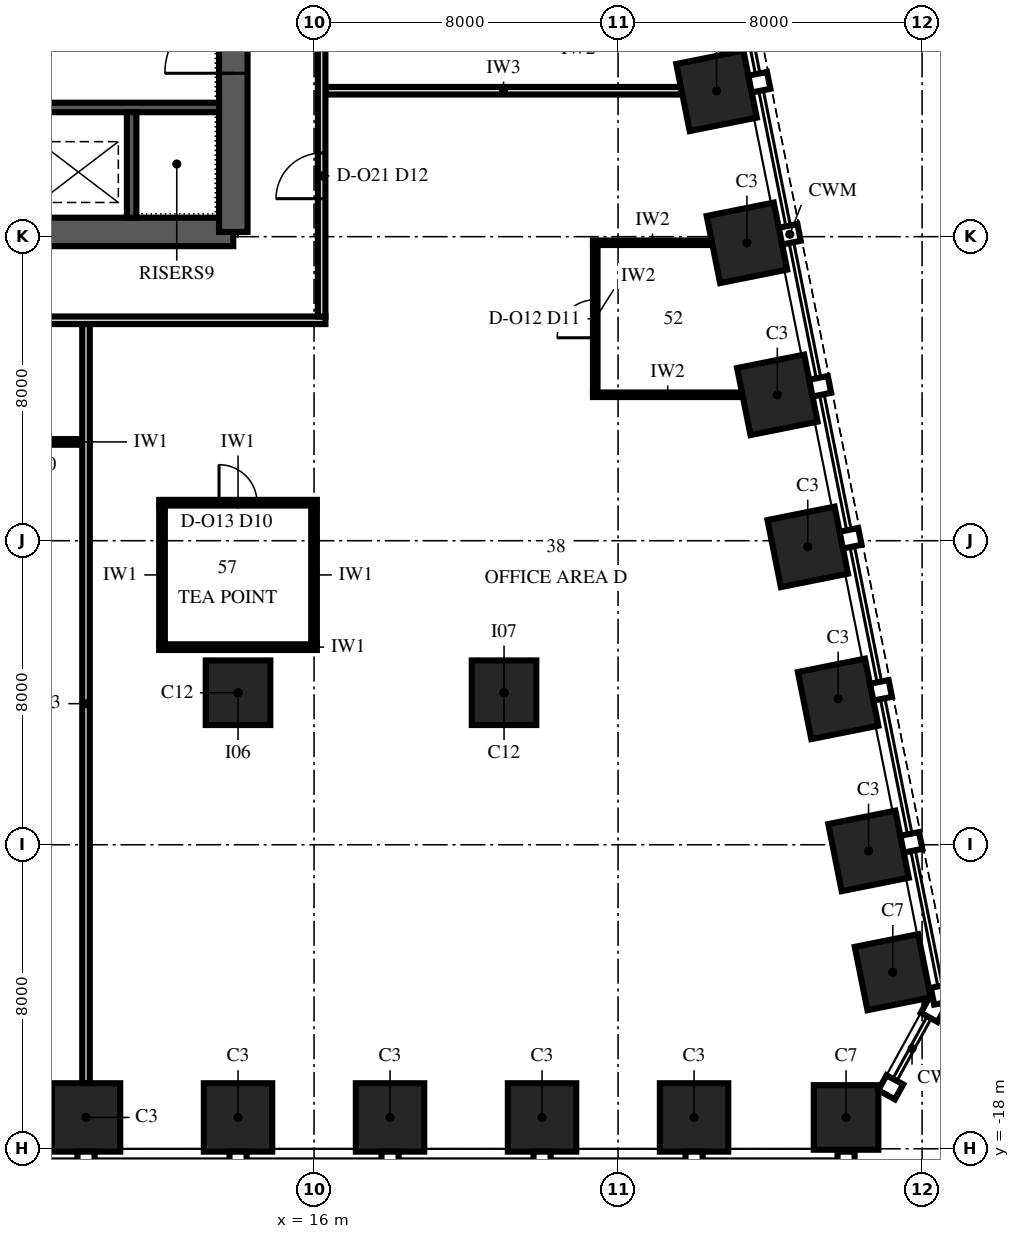
"""IFC4 building model, lengths in metres.
Left out: names, types, materials, properties, quantities, classifications, styles, units other than length and angle.
Written with IfcOpenShell. Run it as: python <this file> out.ifc"""

import sys

from ifc_helpers import new_model, si_unit, direction, frame, frame_2d, origin, origin_2d, place, context, subcontext, project, spatial, polyline, rectangle, outline, extrude, element, fill, save


model = new_model("IFC4")
c1 = context("Model", 3, precision=1e-05, world=origin(), true_north=direction((0.0, 1.0)))
c2 = subcontext(c1, "Body", "Model", "MODEL_VIEW")
j1 = project(units=[si_unit("LENGTHUNIT", "METRE"), si_unit("PLANEANGLEUNIT", "RADIAN")], contexts=[c1])
p1 = place(None, origin())
s1 = spatial("IfcSite", under=j1, at=p1, CompositionType="ELEMENT")
p2 = place(p1, origin())
s2 = spatial("IfcBuilding", under=s1, at=p2, CompositionType="ELEMENT")
p3 = place(p2, frame((0.0, 0.0, 151.0)))
s3 = spatial("IfcBuildingStorey", under=s2, at=p3, CompositionType="ELEMENT", Elevation=151.0)
for number, where, z_axis, x_axis in (
    (1, (10.0, -17.175, 0.0), (0.0, 0.0, 1.0), (1.0, 0.0, 0.0)),
    (2, (14.0, -17.175, 0.0), (0.0, 0.0, 1.0), (1.0, 0.0, 0.0)),
    (3, (18.0, -17.175, 0.0), (0.0, 0.0, 1.0), (1.0, 0.0, 0.0)),
    (4, (22.0, -17.175, 0.0), (0.0, 0.0, 1.0), (1.0, 0.0, 0.0)),
    (5, (26.0, -17.175, 0.0), (0.0, 0.0, 1.0), (1.0, 0.0, 0.0)),
):
    element("IfcColumn", number, at=place(p3, frame(where, z_axis=z_axis, x_axis=x_axis)), inside=s3, PredefinedType="COLUMN", context=c2, shape_type="SweptSolid", body=[
        extrude(rectangle(XDim=1.8, YDim=1.8, at=origin_2d()), origin(), (0.0, 0.0, 1.0), 4.0),
    ])
for number, where, z_axis, x_axis in (
    (6, (30.0, -17.175, 0.0), (0.0, 0.0, 1.0), (1.0, 0.0, 0.0)),
    (7, (31.229, -13.353, 0.0), (0.0, 0.0, 1.0), (-0.196, 0.981, 0.0)),
):
    element("IfcColumn", number, at=place(p3, frame(where, z_axis=z_axis, x_axis=x_axis)), inside=s3, PredefinedType="COLUMN", context=c2, shape_type="SweptSolid", body=[
        extrude(rectangle(XDim=1.7, YDim=1.7, at=origin_2d()), origin(), (0.0, 0.0, 1.0), 4.0),
    ])
for number, where, z_axis, x_axis in (
    (8, (30.591, -10.162, 0.0), (0.0, 0.0, 1.0), (-0.196, 0.981, 0.0)),
    (9, (29.791, -6.162, 0.0), (0.0, 0.0, 1.0), (-0.196, 0.981, 0.0)),
    (10, (28.991, -2.162, 0.0), (0.0, 0.0, 1.0), (-0.196, 0.981, 0.0)),
    (11, (28.191, 1.838, 0.0), (0.0, 0.0, 1.0), (-0.196, 0.981, 0.0)),
    (12, (27.391, 5.838, 0.0), (0.0, 0.0, 1.0), (-0.196, 0.981, 0.0)),
    (13, (26.591, 9.838, 0.0), (0.0, 0.0, 1.0), (-0.196, 0.981, 0.0)),
):
    element("IfcColumn", number, at=place(p3, frame(where, z_axis=z_axis, x_axis=x_axis)), inside=s3, PredefinedType="COLUMN", context=c2, shape_type="SweptSolid", body=[
        extrude(rectangle(XDim=1.8, YDim=1.8, at=origin_2d()), origin(), (0.0, 0.0, 1.0), 4.0),
    ])
for number, where, z_axis, x_axis in (
    (14, (14.0, -6.0, 0.0), (0.0, 0.0, 1.0), (1.0, 0.0, 0.0)),
    (15, (21.0, -6.0, 0.0), (0.0, 0.0, 1.0), (1.0, 0.0, 0.0)),
):
    element("IfcColumn", number, at=place(p3, frame(where, z_axis=z_axis, x_axis=x_axis)), inside=s3, PredefinedType="COLUMN", context=c2, shape_type="SweptSolid", body=[
        extrude(rectangle(XDim=1.7, YDim=1.7, at=origin_2d()), origin(), (0.0, 0.0, 1.0), 4.0),
    ])
p4 = place(p3, frame((-13.875, 6.125, 0.0), z_axis=(0.0, 0.0, 1.0), x_axis=(1.0, 0.0, 0.0)))
e16 = element("IfcWall", 16, at=p4, inside=s3, PredefinedType="SHEAR", context=c2, shape_type="SweptSolid", body=[
    extrude(rectangle(XDim=27.75, YDim=0.75, at=frame_2d((13.875, 0.0))), origin(), (0.0, 0.0, 1.0), 4.0),
])
p5 = place(p3, frame((13.875, 6.125, 0.0), z_axis=(0.0, 0.0, 1.0), x_axis=(0.0, 1.0, 0.0)))
e17 = element("IfcWall", 17, at=p5, inside=s3, PredefinedType="SHEAR", context=c2, shape_type="SweptSolid", body=[
    extrude(outline(polyline([(0.0, -0.375), (17.75, -0.375), (17.75, 0.0), (17.375, 0.0), (17.375, 0.375), (0.375, 0.375), (0.375, 0.0), (0.0, 0.0), (0.0, -0.375)])), origin(), (0.0, 0.0, 1.0), 4.0),
])
p6 = place(p5, frame((4.175, 0.0, 0.0)))
e18 = element("IfcOpeningElement", 18, at=p6, cuts=e17, PredefinedType="OPENING", context=c2, shape_type="SweptSolid", body=[
    extrude(rectangle(XDim=1.8, YDim=2.4, at=frame_2d((0.9, 1.2))), frame((0.0, 0.39, 0.0), z_axis=(0.0, -1.0, 0.0), x_axis=(1.0, 0.0, 0.0)), (0.0, 0.0, 1.0), 0.78),
])
p7 = place(p3, frame((-13.5, 9.4, 0.0), z_axis=(0.0, 0.0, 1.0), x_axis=(1.0, 0.0, 0.0)))
e19 = element("IfcWall", 19, at=p7, inside=s3, PredefinedType="SHEAR", context=c2, shape_type="SweptSolid", body=[
    extrude(rectangle(XDim=27.0, YDim=0.25, at=frame_2d((13.5, 0.0))), origin(), (0.0, 0.0, 1.0), 4.0),
])
p8 = place(p7, frame((0.35, 0.0, 0.0)))
e20 = element("IfcOpeningElement", 20, at=p8, cuts=e19, PredefinedType="OPENING", context=c2, shape_type="SweptSolid", body=[
    extrude(rectangle(XDim=1.1, YDim=2.1, at=frame_2d((0.55, 1.05))), frame((0.0, 0.14, 0.0), z_axis=(0.0, -1.0, 0.0), x_axis=(1.0, 0.0, 0.0)), (0.0, 0.0, 1.0), 0.28),
])
p9 = place(p7, frame((3.15, 0.0, 0.0)))
e21 = element("IfcOpeningElement", 21, at=p9, cuts=e19, PredefinedType="OPENING", context=c2, shape_type="SweptSolid", body=[
    extrude(rectangle(XDim=1.1, YDim=2.1, at=frame_2d((0.55, 1.05))), frame((0.0, 0.14, 0.0), z_axis=(0.0, -1.0, 0.0), x_axis=(1.0, 0.0, 0.0)), (0.0, 0.0, 1.0), 0.28),
])
p10 = place(p7, frame((5.95, 0.0, 0.0)))
e22 = element("IfcOpeningElement", 22, at=p10, cuts=e19, PredefinedType="OPENING", context=c2, shape_type="SweptSolid", body=[
    extrude(rectangle(XDim=1.1, YDim=2.1, at=frame_2d((0.55, 1.05))), frame((0.0, 0.14, 0.0), z_axis=(0.0, -1.0, 0.0), x_axis=(1.0, 0.0, 0.0)), (0.0, 0.0, 1.0), 0.28),
])
p11 = place(p3, frame((11.2, 6.5, 0.0), z_axis=(0.0, 0.0, 1.0), x_axis=(0.0, 1.0, 0.0)))
e23 = element("IfcWall", 23, at=p11, inside=s3, PredefinedType="SHEAR", context=c2, shape_type="SweptSolid", body=[
    extrude(rectangle(XDim=2.775, YDim=0.25, at=frame_2d((1.387, 0.0))), origin(), (0.0, 0.0, 1.0), 4.0),
])
p12 = place(p3, frame((11.925, -4.8, 0.0), z_axis=(0.0, 0.0, 1.0), x_axis=(1.0, 0.0, 0.0)))
e24 = element("IfcWall", 24, at=p12, inside=s3, PredefinedType="PARTITIONING", context=c2, shape_type="SweptSolid", body=[
    extrude(rectangle(XDim=4.15, YDim=0.15, at=frame_2d((2.075, 0.0))), origin(), (0.0, 0.0, 1.0), 3.25),
])
p13 = place(p3, frame((11.925, -1.0, 0.0), z_axis=(0.0, 0.0, 1.0), x_axis=(1.0, 0.0, 0.0)))
e25 = element("IfcWall", 25, at=p13, inside=s3, PredefinedType="PARTITIONING", context=c2, shape_type="SweptSolid", body=[
    extrude(rectangle(XDim=4.15, YDim=0.15, at=frame_2d((2.075, 0.0))), origin(), (0.0, 0.0, 1.0), 3.25),
])
p14 = place(p13, frame((1.575, 0.0, 0.0)))
e26 = element("IfcOpeningElement", 26, at=p14, cuts=e25, PredefinedType="OPENING", context=c2, shape_type="SweptSolid", body=[
    extrude(rectangle(XDim=1.0, YDim=2.3, at=frame_2d((0.5, 1.15))), frame((0.0, 0.09, 0.0), z_axis=(0.0, -1.0, 0.0), x_axis=(1.0, 0.0, 0.0)), (0.0, 0.0, 1.0), 0.18),
])
p15 = place(p3, frame((5.925, 0.6, 0.0), z_axis=(0.0, 0.0, 1.0), x_axis=(1.0, 0.0, 0.0)))
e27 = element("IfcWall", 27, at=p15, inside=s3, PredefinedType="PARTITIONING", context=c2, shape_type="SweptSolid", body=[
    extrude(rectangle(XDim=3.975, YDim=0.15, at=frame_2d((1.987, 0.0))), origin(), (0.0, 0.0, 1.0), 3.85),
])
p16 = place(p15, frame((1.575, 0.0, 0.0)))
e28 = element("IfcOpeningElement", 28, at=p16, cuts=e27, PredefinedType="OPENING", context=c2, shape_type="SweptSolid", body=[
    extrude(rectangle(XDim=1.0, YDim=2.3, at=frame_2d((0.5, 1.15))), frame((0.0, 0.09, 0.0), z_axis=(0.0, -1.0, 0.0), x_axis=(1.0, 0.0, 0.0)), (0.0, 0.0, 1.0), 0.18),
])
p17 = place(p3, frame((23.34, 1.84, 0.0), z_axis=(0.0, 0.0, 1.0), x_axis=(1.0, 0.0, 0.0)))
e29 = element("IfcWall", 29, at=p17, inside=s3, PredefinedType="PARTITIONING", context=c2, shape_type="SweptSolid", body=[
    extrude(rectangle(XDim=3.933, YDim=0.12, at=frame_2d((1.966, 0.0))), origin(), (0.0, 0.0, 1.0), 3.25),
])
p18 = place(p3, frame((-16.3, 3.8, 0.0), z_axis=(0.0, 0.0, 1.0), x_axis=(1.0, 0.0, 0.0)))
e30 = element("IfcWall", 30, at=p18, inside=s3, PredefinedType="PARTITIONING", context=c2, shape_type="SweptSolid", body=[
    extrude(rectangle(XDim=32.6, YDim=0.2, at=frame_2d((16.3, 0.0))), origin(), (0.0, 0.0, 1.0), 3.25),
])
p19 = place(p18, frame((1.7, 0.0, 0.0)))
e31 = element("IfcOpeningElement", 31, at=p19, cuts=e30, PredefinedType="OPENING", context=c2, shape_type="SweptSolid", body=[
    extrude(rectangle(XDim=1.2, YDim=2.4, at=frame_2d((0.6, 1.2))), frame((0.0, 0.115, 0.0), z_axis=(0.0, -1.0, 0.0), x_axis=(1.0, 0.0, 0.0)), (0.0, 0.0, 1.0), 0.23),
])
p20 = place(p18, frame((12.7, 0.0, 0.0)))
e32 = element("IfcOpeningElement", 32, at=p20, cuts=e30, PredefinedType="OPENING", context=c2, shape_type="SweptSolid", body=[
    extrude(rectangle(XDim=1.2, YDim=2.4, at=frame_2d((0.6, 1.2))), frame((0.0, 0.115, 0.0), z_axis=(0.0, -1.0, 0.0), x_axis=(1.0, 0.0, 0.0)), (0.0, 0.0, 1.0), 0.23),
])
p21 = place(p3, frame((23.34, 5.84, 0.0), z_axis=(0.0, 0.0, 1.0), x_axis=(1.0, 0.0, 0.0)))
e33 = element("IfcWall", 33, at=p21, inside=s3, PredefinedType="PARTITIONING", context=c2, shape_type="SweptSolid", body=[
    extrude(rectangle(XDim=3.133, YDim=0.12, at=frame_2d((1.566, 0.0))), origin(), (0.0, 0.0, 1.0), 2.842),
])
p22 = place(p3, frame((16.3, 9.84, 0.0), z_axis=(0.0, 0.0, 1.0), x_axis=(1.0, 0.0, 0.0)))
e34 = element("IfcWall", 34, at=p22, inside=s3, PredefinedType="PARTITIONING", context=c2, shape_type="SweptSolid", body=[
    extrude(rectangle(XDim=9.373, YDim=0.2, at=frame_2d((4.687, 0.0))), origin(), (0.0, 0.0, 1.0), 3.25),
])
p23 = place(p3, frame((10.0, -16.275, 0.0), z_axis=(0.0, 0.0, 1.0), x_axis=(0.0, 1.0, 0.0)))
e35 = element("IfcWall", 35, at=p23, inside=s3, PredefinedType="PARTITIONING", context=c2, shape_type="SweptSolid", body=[
    extrude(rectangle(XDim=19.975, YDim=0.2, at=frame_2d((9.987, 0.0))), origin(), (0.0, 0.0, 1.0), 2.842),
])
for number, where, z_axis, x_axis in (
    (36, (12.0, -4.725, 0.0), (0.0, 0.0, 1.0), (0.0, 1.0, 0.0)),
    (37, (16.0, -4.725, 0.0), (0.0, 0.0, 1.0), (0.0, 1.0, 0.0)),
):
    element("IfcWall", number, at=place(p3, frame(where, z_axis=z_axis, x_axis=x_axis)), inside=s3, PredefinedType="PARTITIONING", context=c2, shape_type="SweptSolid", body=[
        extrude(rectangle(XDim=3.65, YDim=0.15, at=frame_2d((1.825, 0.0))), origin(), (0.0, 0.0, 1.0), 3.85),
    ])
p24 = place(p3, frame((16.2, 3.9, 0.0), z_axis=(0.0, 0.0, 1.0), x_axis=(0.0, 1.0, 0.0)))
e38 = element("IfcWall", 38, at=p24, inside=s3, PredefinedType="PARTITIONING", context=c2, shape_type="SweptSolid", body=[
    extrude(rectangle(XDim=24.375, YDim=0.2, at=frame_2d((12.188, 0.0))), origin(), (0.0, 0.0, 1.0), 2.842),
])
p25 = place(p24, frame((3.1, 0.0, 0.0)))
e39 = element("IfcOpeningElement", 39, at=p25, cuts=e38, PredefinedType="OPENING", context=c2, shape_type="SweptSolid", body=[
    extrude(rectangle(XDim=1.2, YDim=2.4, at=frame_2d((0.6, 1.2))), frame((0.0, 0.115, 0.0), z_axis=(0.0, -1.0, 0.0), x_axis=(1.0, 0.0, 0.0)), (0.0, 0.0, 1.0), 0.23),
])
p26 = place(p24, frame((10.5, 0.0, 0.0)))
e40 = element("IfcOpeningElement", 40, at=p26, cuts=e38, PredefinedType="OPENING", context=c2, shape_type="SweptSolid", body=[
    extrude(rectangle(XDim=1.2, YDim=2.4, at=frame_2d((0.6, 1.2))), frame((0.0, 0.115, 0.0), z_axis=(0.0, -1.0, 0.0), x_axis=(1.0, 0.0, 0.0)), (0.0, 0.0, 1.0), 0.23),
])
p27 = place(p3, frame((23.4, 1.9, 0.0), z_axis=(0.0, 0.0, 1.0), x_axis=(0.0, 1.0, 0.0)))
e41 = element("IfcWall", 41, at=p27, inside=s3, PredefinedType="PARTITIONING", context=c2, shape_type="SweptSolid", body=[
    extrude(rectangle(XDim=3.88, YDim=0.12, at=frame_2d((1.94, 0.0))), origin(), (0.0, 0.0, 1.0), 3.85),
])
p28 = place(p27, frame((1.44, 0.0, 0.0)))
e42 = element("IfcOpeningElement", 42, at=p28, cuts=e41, PredefinedType="OPENING", context=c2, shape_type="SweptSolid", body=[
    extrude(rectangle(XDim=1.0, YDim=2.4, at=frame_2d((0.5, 1.2))), frame((0.0, 0.075, 0.0), z_axis=(0.0, -1.0, 0.0), x_axis=(1.0, 0.0, 0.0)), (0.0, 0.0, 1.0), 0.15),
])
p29 = place(p6, origin())
e43 = element("IfcDoor", 43, at=p29, inside=s3, OperationType="DOUBLE_DOOR_SINGLE_SWING", PredefinedType="DOOR", context=c2, shape_type="SweptSolid", body=[
    extrude(rectangle(XDim=1.8, YDim=2.4, at=frame_2d((0.9, 1.2))), frame((0.0, 0.375, 0.0), z_axis=(0.0, -1.0, 0.0), x_axis=(1.0, 0.0, 0.0)), (0.0, 0.0, 1.0), 0.75),
])
fill(e18, e43)
p30 = place(p28, origin())
e44 = element("IfcDoor", 44, at=p30, inside=s3, OperationType="SINGLE_SWING_RIGHT", PredefinedType="DOOR", context=c2, shape_type="SweptSolid", body=[
    extrude(rectangle(XDim=1.0, YDim=2.4, at=frame_2d((0.5, 1.2))), frame((0.0, 0.06, 0.0), z_axis=(0.0, -1.0, 0.0), x_axis=(1.0, 0.0, 0.0)), (0.0, 0.0, 1.0), 0.12),
])
fill(e42, e44)
p31 = place(p14, origin())
e45 = element("IfcDoor", 45, at=p31, inside=s3, OperationType="SINGLE_SWING_LEFT", PredefinedType="DOOR", context=c2, shape_type="SweptSolid", body=[
    extrude(rectangle(XDim=1.0, YDim=2.3, at=frame_2d((0.5, 1.15))), frame((0.0, 0.075, 0.0), z_axis=(0.0, -1.0, 0.0), x_axis=(1.0, 0.0, 0.0)), (0.0, 0.0, 1.0), 0.149),
])
fill(e26, e45)
p32 = place(p25, origin())
e46 = element("IfcDoor", 46, at=p32, inside=s3, OperationType="SINGLE_SWING_LEFT", PredefinedType="DOOR", context=c2, shape_type="SweptSolid", body=[
    extrude(rectangle(XDim=1.2, YDim=2.4, at=frame_2d((0.6, 1.2))), frame((0.0, 0.1, 0.0), z_axis=(0.0, -1.0, 0.0), x_axis=(1.0, 0.0, 0.0)), (0.0, 0.0, 1.0), 0.199),
])
fill(e39, e46)
save(model, sys.argv[1])
